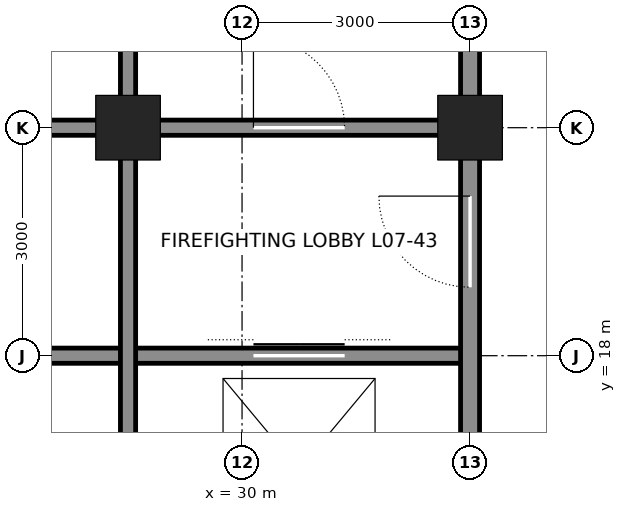
"""IFC4 building model, lengths in metres.
Left out: names, types, materials, properties, quantities, classifications, styles, units other than length and angle.
Written with IfcOpenShell. Run it as: python <this file> out.ifc"""

import sys

from ifc_helpers import new_model, si_unit, direction, frame, frame_2d, origin, origin_2d, place, context, subcontext, project, spatial, rectangle, hollow_rectangle, extrude, element, fill, save


model = new_model("IFC4")
c1 = context("Model", 3, precision=1e-05, world=origin(), true_north=direction((0.0, 1.0)))
c2 = subcontext(c1, "Body", "Model", "MODEL_VIEW")
j1 = project(units=[si_unit("LENGTHUNIT", "METRE"), si_unit("PLANEANGLEUNIT", "RADIAN")], contexts=[c1])
p1 = place(None, origin())
s1 = spatial("IfcSite", under=j1, at=p1, CompositionType="ELEMENT")
p2 = place(p1, origin())
s2 = spatial("IfcBuilding", under=s1, at=p2, CompositionType="ELEMENT")
p3 = place(p2, frame((0.0, 0.0, 37.8)))
s3 = spatial("IfcBuildingStorey", under=s2, at=p3, CompositionType="ELEMENT", Elevation=37.8)
for number, where, z_axis, x_axis in (
    (1, (33.0, 21.0, 0.0), (0.0, 0.0, 1.0), (1.0, 0.0, 0.0)),
    (2, (28.5, 21.0, 0.0), (0.0, 0.0, 1.0), (1.0, 0.0, 0.0)),
):
    element("IfcColumn", number, at=place(p3, frame(where, z_axis=z_axis, x_axis=x_axis)), inside=s3, PredefinedType="COLUMN", context=c2, shape_type="SweptSolid", body=[
        extrude(hollow_rectangle(XDim=0.85, YDim=0.85, WallThickness=0.085, at=origin_2d()), origin(), (0.0, 0.0, 1.0), 4.5),
    ])
p4 = place(p3, frame((25.5, 18.0, 0.0), z_axis=(0.0, 0.0, 1.0), x_axis=(1.0, 0.0, 0.0)))
e3 = element("IfcWall", 3, at=p4, inside=s3, PredefinedType="SOLIDWALL", context=c2, shape_type="SweptSolid", body=[
    extrude(rectangle(XDim=7.5, YDim=0.2, at=frame_2d((3.75, 0.0))), origin(), (0.0, 0.0, 1.0), 4.34),
])
p5 = place(p4, frame((4.65, 0.0, 0.0)))
e4 = element("IfcOpeningElement", 4, at=p5, cuts=e3, PredefinedType="OPENING", context=c2, shape_type="SweptSolid", body=[
    extrude(rectangle(XDim=1.2, YDim=2.1, at=frame_2d((0.6, 1.05))), frame((0.0, 0.11, 0.0), z_axis=(0.0, -1.0, 0.0), x_axis=(1.0, 0.0, 0.0)), (0.0, 0.0, 1.0), 0.22),
])
p6 = place(p3, frame((25.5, 21.0, 0.0), z_axis=(0.0, 0.0, 1.0), x_axis=(1.0, 0.0, 0.0)))
e5 = element("IfcWall", 5, at=p6, inside=s3, PredefinedType="SOLIDWALL", context=c2, shape_type="SweptSolid", body=[
    extrude(rectangle(XDim=2.75, YDim=0.2, at=frame_2d((1.375, 0.0))), origin(), (0.0, 0.0, 1.0), 3.39),
])
p7 = place(p3, frame((28.75, 21.0, 0.0), z_axis=(0.0, 0.0, 1.0), x_axis=(1.0, 0.0, 0.0)))
e6 = element("IfcWall", 6, at=p7, inside=s3, PredefinedType="SOLIDWALL", context=c2, shape_type="SweptSolid", body=[
    extrude(rectangle(XDim=4.0, YDim=0.2, at=frame_2d((2.0, 0.0))), origin(), (0.0, 0.0, 1.0), 3.39),
])
p8 = place(p7, frame((1.4, 0.0, 0.0)))
e7 = element("IfcOpeningElement", 7, at=p8, cuts=e6, PredefinedType="OPENING", context=c2, shape_type="SweptSolid", body=[
    extrude(rectangle(XDim=1.2, YDim=2.1, at=frame_2d((0.6, 1.05))), frame((0.0, 0.11, 0.0), z_axis=(0.0, -1.0, 0.0), x_axis=(1.0, 0.0, 0.0)), (0.0, 0.0, 1.0), 0.22),
])
p9 = place(p3, frame((28.5, 12.25, 0.0), z_axis=(0.0, 0.0, 1.0), x_axis=(0.0, 1.0, 0.0)))
e8 = element("IfcWall", 8, at=p9, inside=s3, PredefinedType="SOLIDWALL", context=c2, shape_type="SweptSolid", body=[
    extrude(rectangle(XDim=8.5, YDim=0.2, at=frame_2d((4.25, 0.0))), origin(), (0.0, 0.0, 1.0), 3.413),
])
p10 = place(p3, frame((28.5, 21.25, 0.0), z_axis=(0.0, 0.0, 1.0), x_axis=(0.0, 1.0, 0.0)))
e9 = element("IfcWall", 9, at=p10, inside=s3, PredefinedType="SOLIDWALL", context=c2, shape_type="SweptSolid", body=[
    extrude(rectangle(XDim=2.5, YDim=0.2, at=frame_2d((1.25, 0.0))), origin(), (0.0, 0.0, 1.0), 3.413),
])
p11 = place(p3, frame((33.0, 12.25, 0.0), z_axis=(0.0, 0.0, 1.0), x_axis=(0.0, 1.0, 0.0)))
e10 = element("IfcWall", 10, at=p11, inside=s3, PredefinedType="SOLIDWALL", context=c2, shape_type="SweptSolid", body=[
    extrude(rectangle(XDim=8.5, YDim=0.25, at=frame_2d((4.25, 0.0))), origin(), (0.0, 0.0, 1.0), 3.113),
])
p12 = place(p11, frame((6.65, 0.0, 0.0)))
e11 = element("IfcOpeningElement", 11, at=p12, cuts=e10, PredefinedType="OPENING", context=c2, shape_type="SweptSolid", body=[
    extrude(rectangle(XDim=1.2, YDim=2.1, at=frame_2d((0.6, 1.05))), frame((0.0, 0.135, 0.0), z_axis=(0.0, -1.0, 0.0), x_axis=(1.0, 0.0, 0.0)), (0.0, 0.0, 1.0), 0.27),
])
p13 = place(p11, frame((0.875, 0.0, 0.0)))
e12 = element("IfcOpeningElement", 12, at=p13, cuts=e10, PredefinedType="OPENING", context=c2, shape_type="SweptSolid", body=[
    extrude(rectangle(XDim=0.75, YDim=2.1, at=frame_2d((0.375, 1.05))), frame((0.0, 0.135, 0.0), z_axis=(0.0, -1.0, 0.0), x_axis=(1.0, 0.0, 0.0)), (0.0, 0.0, 1.0), 0.27),
])
p14 = place(p3, frame((33.0, 21.25, 0.0), z_axis=(0.0, 0.0, 1.0), x_axis=(0.0, 1.0, 0.0)))
e13 = element("IfcWall", 13, at=p14, inside=s3, PredefinedType="SOLIDWALL", context=c2, shape_type="SweptSolid", body=[
    extrude(rectangle(XDim=2.5, YDim=0.25, at=frame_2d((1.25, 0.0))), origin(), (0.0, 0.0, 1.0), 3.113),
])
p15 = place(p8, origin())
e14 = element("IfcDoor", 14, at=p15, inside=s3, OperationType="SINGLE_SWING_LEFT", PredefinedType="DOOR", context=c2, shape_type="SweptSolid", body=[
    extrude(rectangle(XDim=1.2, YDim=2.1, at=frame_2d((0.6, 1.05))), frame((0.0, 0.025, 0.0), z_axis=(0.0, -1.0, 0.0), x_axis=(1.0, 0.0, 0.0)), (0.0, 0.0, 1.0), 0.05),
])
fill(e7, e14)
p16 = place(p12, origin())
e15 = element("IfcDoor", 15, at=p16, inside=s3, OperationType="SINGLE_SWING_RIGHT", PredefinedType="DOOR", context=c2, shape_type="SweptSolid", body=[
    extrude(rectangle(XDim=1.2, YDim=2.1, at=frame_2d((0.6, 1.05))), frame((0.0, 0.025, 0.0), z_axis=(0.0, -1.0, 0.0), x_axis=(1.0, 0.0, 0.0)), (0.0, 0.0, 1.0), 0.05),
])
fill(e11, e15)
p17 = place(p5, origin())
e16 = element("IfcDoor", 16, at=p17, inside=s3, OperationType="DOUBLE_DOOR_SLIDING", PredefinedType="DOOR", context=c2, shape_type="SweptSolid", body=[
    extrude(rectangle(XDim=1.2, YDim=2.1, at=frame_2d((0.6, 1.05))), frame((0.0, 0.025, 0.0), z_axis=(0.0, -1.0, 0.0), x_axis=(1.0, 0.0, 0.0)), (0.0, 0.0, 1.0), 0.05),
])
fill(e4, e16)
save(model, sys.argv[1])
